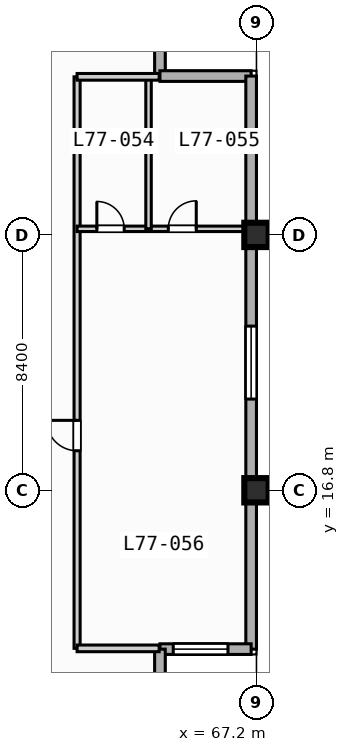
"""IFC4 building model, lengths in metres.
Left out: names, types, materials, properties, quantities, classifications, styles, units other than length and angle.
Written with IfcOpenShell. Run it as: python <this file> out.ifc"""

import sys

from ifc_helpers import new_model, si_unit, direction, frame, frame_2d, origin, origin_2d, place, context, subcontext, project, spatial, rectangle, extrude, element, fill, save


model = new_model("IFC4")
c1 = context("Model", 3, precision=1e-05, world=origin(), true_north=direction((0.0, 1.0)))
c2 = subcontext(c1, "Body", "Model", "MODEL_VIEW")
j1 = project(units=[si_unit("LENGTHUNIT", "METRE"), si_unit("PLANEANGLEUNIT", "RADIAN")], contexts=[c1])
p1 = place(None, origin())
s1 = spatial("IfcSite", under=j1, at=p1, CompositionType="ELEMENT")
p2 = place(p1, origin())
s2 = spatial("IfcBuilding", under=s1, at=p2, CompositionType="ELEMENT")
p3 = place(p2, frame((0.0, 0.0, 312.5)))
s3 = spatial("IfcBuildingStorey", under=s2, at=p3, CompositionType="ELEMENT", Elevation=312.5)
for number, where, z_axis, x_axis in (
    (1, (67.2, 16.8, 0.0), (0.0, 0.0, 1.0), (1.0, 0.0, 0.0)),
    (2, (67.2, 25.2, 0.0), (0.0, 0.0, 1.0), (1.0, 0.0, 0.0)),
):
    element("IfcColumn", number, at=place(p3, frame(where, z_axis=z_axis, x_axis=x_axis)), inside=s3, PredefinedType="COLUMN", context=c2, shape_type="SweptSolid", body=[
        extrude(rectangle(XDim=0.8, YDim=0.8, at=origin_2d()), origin(), (0.0, 0.0, 1.0), 3.9),
    ])
for number, where, z_axis, x_axis in (
    (3, (64.025, 33.425, 0.0), (0.0, 0.0, 1.0), (0.0, -1.0, 0.0)),
    (4, (64.025, 30.425, 0.0), (0.0, 0.0, 1.0), (1.0, 0.0, 0.0)),
):
    element("IfcWall", number, at=place(p3, frame(where, z_axis=z_axis, x_axis=x_axis)), inside=s3, PredefinedType="STANDARD", context=c2, shape_type="SweptSolid", body=[
        extrude(rectangle(XDim=3.0, YDim=0.35, at=frame_2d((1.5, 0.0))), origin(), (0.0, 0.0, 1.0), 3.67),
    ])
p4 = place(p3, frame((67.025, 30.425, 0.0), z_axis=(0.0, 0.0, 1.0), x_axis=(0.0, -1.0, 0.0)))
e5 = element("IfcWall", 5, at=p4, inside=s3, PredefinedType="STANDARD", context=c2, shape_type="SweptSolid", body=[
    extrude(rectangle(XDim=18.85, YDim=0.35, at=frame_2d((9.425, 0.0))), origin(), (0.0, 0.0, 1.0), 3.67),
])
p5 = place(p4, frame((8.225, 0.0, 0.85)))
e6 = element("IfcOpeningElement", 6, at=p5, cuts=e5, PredefinedType="OPENING", context=c2, shape_type="SweptSolid", body=[
    extrude(rectangle(XDim=2.4, YDim=1.95, at=frame_2d((1.2, 0.975))), frame((0.0, 0.185, 0.0), z_axis=(0.0, -1.0, 0.0), x_axis=(1.0, 0.0, 0.0)), (0.0, 0.0, 1.0), 0.37),
])
p6 = place(p3, frame((67.025, 11.575, 0.0), z_axis=(0.0, 0.0, 1.0), x_axis=(-1.0, 0.0, 0.0)))
e7 = element("IfcWall", 7, at=p6, inside=s3, PredefinedType="STANDARD", context=c2, shape_type="SweptSolid", body=[
    extrude(rectangle(XDim=3.0, YDim=0.35, at=frame_2d((1.5, 0.0))), origin(), (0.0, 0.0, 1.0), 3.67),
])
p7 = place(p6, frame((0.762, 0.0, 0.85)))
e8 = element("IfcOpeningElement", 8, at=p7, cuts=e7, PredefinedType="OPENING", context=c2, shape_type="SweptSolid", body=[
    extrude(rectangle(XDim=1.8, YDim=1.8, at=frame_2d((0.9, 0.9))), frame((0.0, 0.185, 0.0), z_axis=(0.0, -1.0, 0.0), x_axis=(1.0, 0.0, 0.0)), (0.0, 0.0, 1.0), 0.37),
])
p8 = place(p3, frame((64.025, 11.575, 0.0), z_axis=(0.0, 0.0, 1.0), x_axis=(0.0, -1.0, 0.0)))
e9 = element("IfcWall", 9, at=p8, inside=s3, PredefinedType="STANDARD", context=c2, shape_type="SweptSolid", body=[
    extrude(rectangle(XDim=3.0, YDim=0.35, at=frame_2d((1.5, 0.0))), origin(), (0.0, 0.0, 1.0), 3.67),
])
p9 = place(p3, frame((61.3, 11.6, 0.0), z_axis=(0.0, 0.0, 1.0), x_axis=(0.0, 1.0, 0.0)))
e10 = element("IfcWall", 10, at=p9, inside=s3, PredefinedType="PARTITIONING", context=c2, shape_type="SweptSolid", body=[
    extrude(rectangle(XDim=18.8, YDim=0.2, at=frame_2d((9.4, 0.0))), origin(), (0.0, 0.0, 1.0), 3.67),
])
p10 = place(p9, frame((6.5, 0.0, 0.0)))
e11 = element("IfcOpeningElement", 11, at=p10, cuts=e10, PredefinedType="OPENING", context=c2, shape_type="SweptSolid", body=[
    extrude(rectangle(XDim=1.0, YDim=2.15, at=frame_2d((0.5, 1.075))), frame((0.0, 0.11, 0.0), z_axis=(0.0, -1.0, 0.0), x_axis=(1.0, 0.0, 0.0)), (0.0, 0.0, 1.0), 0.22),
])
p11 = place(p3, frame((61.3, 25.4, 0.0), z_axis=(0.0, 0.0, 1.0), x_axis=(1.0, 0.0, 0.0)))
e12 = element("IfcWall", 12, at=p11, inside=s3, PredefinedType="PLUMBINGWALL", context=c2, shape_type="SweptSolid", body=[
    extrude(rectangle(XDim=5.5, YDim=0.18, at=frame_2d((2.75, 0.0))), origin(), (0.0, 0.0, 1.0), 3.207),
])
p12 = place(p11, frame((0.65, 0.0, 0.0)))
e13 = element("IfcOpeningElement", 13, at=p12, cuts=e12, PredefinedType="OPENING", context=c2, shape_type="SweptSolid", body=[
    extrude(rectangle(XDim=0.9, YDim=2.1, at=frame_2d((0.45, 1.05))), frame((0.0, 0.1, 0.0), z_axis=(0.0, -1.0, 0.0), x_axis=(1.0, 0.0, 0.0)), (0.0, 0.0, 1.0), 0.2),
])
p13 = place(p11, frame((3.0, 0.0, 0.0)))
e14 = element("IfcOpeningElement", 14, at=p13, cuts=e12, PredefinedType="OPENING", context=c2, shape_type="SweptSolid", body=[
    extrude(rectangle(XDim=0.92, YDim=2.1, at=frame_2d((0.46, 1.05))), frame((0.0, 0.1, 0.0), z_axis=(0.0, -1.0, 0.0), x_axis=(1.0, 0.0, 0.0)), (0.0, 0.0, 1.0), 0.2),
])
p14 = place(p3, frame((63.65, 25.4, 0.0), z_axis=(0.0, 0.0, 1.0), x_axis=(0.0, 1.0, 0.0)))
e15 = element("IfcWall", 15, at=p14, inside=s3, PredefinedType="PLUMBINGWALL", context=c2, shape_type="SweptSolid", body=[
    extrude(rectangle(XDim=5.0, YDim=0.18, at=frame_2d((2.5, 0.0))), origin(), (0.0, 0.0, 1.0), 3.67),
])
for number, where, z_axis, x_axis in (
    (16, (61.3, 11.6, 0.0), (0.0, 0.0, 1.0), (1.0, 0.0, 0.0)),
    (17, (61.3, 30.4, 0.0), (0.0, 0.0, 1.0), (1.0, 0.0, 0.0)),
):
    element("IfcWall", number, at=place(p3, frame(where, z_axis=z_axis, x_axis=x_axis)), inside=s3, PredefinedType="PARTITIONING", context=c2, shape_type="SweptSolid", body=[
        extrude(rectangle(XDim=2.7, YDim=0.22, at=frame_2d((1.35, 0.0))), origin(), (0.0, 0.0, 1.0), 3.67),
    ])
p15 = place(p5, origin())
e18 = element("IfcWindow", 18, at=p15, inside=s3, PartitioningType="SINGLE_PANEL", PredefinedType="WINDOW", context=c2, shape_type="SweptSolid", body=[
    extrude(rectangle(XDim=2.4, YDim=1.95, at=frame_2d((1.2, 0.975))), frame((0.0, 0.03, 0.0), z_axis=(0.0, -1.0, 0.0), x_axis=(1.0, 0.0, 0.0)), (0.0, 0.0, 1.0), 0.06),
])
fill(e6, e18)
p16 = place(p7, origin())
e19 = element("IfcWindow", 19, at=p16, inside=s3, PartitioningType="SINGLE_PANEL", PredefinedType="WINDOW", context=c2, shape_type="SweptSolid", body=[
    extrude(rectangle(XDim=1.8, YDim=1.8, at=frame_2d((0.9, 0.9))), frame((0.0, 0.03, 0.0), z_axis=(0.0, -1.0, 0.0), x_axis=(1.0, 0.0, 0.0)), (0.0, 0.0, 1.0), 0.06),
])
fill(e8, e19)
p17 = place(p10, origin())
e20 = element("IfcDoor", 20, at=p17, inside=s3, OperationType="SINGLE_SWING_RIGHT", PredefinedType="DOOR", context=c2, shape_type="SweptSolid", body=[
    extrude(rectangle(XDim=1.0, YDim=2.15, at=frame_2d((0.5, 1.075))), frame((0.0, 0.025, 0.0), z_axis=(0.0, -1.0, 0.0), x_axis=(1.0, 0.0, 0.0)), (0.0, 0.0, 1.0), 0.05),
])
fill(e11, e20)
p18 = place(p12, origin())
e21 = element("IfcDoor", 21, at=p18, inside=s3, OperationType="SINGLE_SWING_LEFT", PredefinedType="DOOR", context=c2, shape_type="SweptSolid", body=[
    extrude(rectangle(XDim=0.9, YDim=2.1, at=frame_2d((0.45, 1.05))), frame((0.0, 0.025, 0.0), z_axis=(0.0, -1.0, 0.0), x_axis=(1.0, 0.0, 0.0)), (0.0, 0.0, 1.0), 0.05),
])
fill(e13, e21)
p19 = place(p13, origin())
e22 = element("IfcDoor", 22, at=p19, inside=s3, OperationType="SINGLE_SWING_RIGHT", PredefinedType="DOOR", context=c2, shape_type="SweptSolid", body=[
    extrude(rectangle(XDim=0.92, YDim=2.1, at=frame_2d((0.46, 1.05))), frame((0.0, 0.025, 0.0), z_axis=(0.0, -1.0, 0.0), x_axis=(1.0, 0.0, 0.0)), (0.0, 0.0, 1.0), 0.05),
])
fill(e14, e22)
save(model, sys.argv[1])
